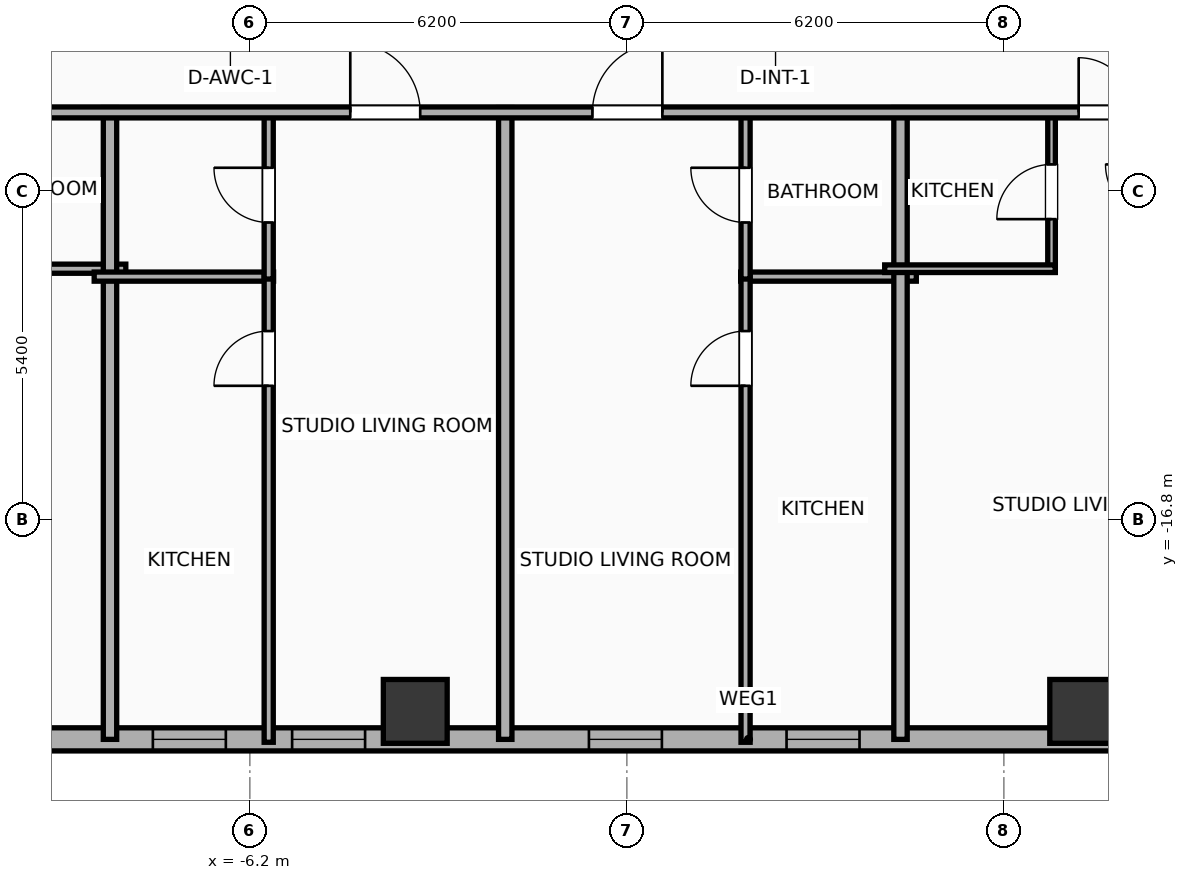
"""IFC4 building model, lengths in metres.
Left out: names, types, materials, properties, quantities, classifications, styles, units other than length and angle.
Written with IfcOpenShell. Run it as: python <this file> out.ifc"""

import sys

from ifc_helpers import new_model, si_unit, direction, frame, frame_2d, origin, origin_2d, place, context, subcontext, project, spatial, rectangle, hollow_rectangle, extrude, element, fill, save


model = new_model("IFC4")
c1 = context("Model", 3, precision=1e-05, world=origin(), true_north=direction((0.0, 1.0)))
c2 = subcontext(c1, "Body", "Model", "MODEL_VIEW")
j1 = project(units=[si_unit("LENGTHUNIT", "METRE"), si_unit("PLANEANGLEUNIT", "RADIAN")], contexts=[c1])
p1 = place(None, origin())
s1 = spatial("IfcSite", under=j1, at=p1, CompositionType="ELEMENT")
p2 = place(p1, origin())
s2 = spatial("IfcBuilding", under=s1, at=p2, CompositionType="ELEMENT")
p3 = place(p2, frame((0.0, 0.0, 128.7)))
s3 = spatial("IfcBuildingStorey", under=s2, at=p3, CompositionType="ELEMENT", Elevation=128.7)
for number, where, z_axis, x_axis in (
    (1, (-3.48, -19.95, 0.0), (0.0, 0.0, 1.0), (1.0, 0.0, 0.0)),
    (2, (7.48, -19.95, 0.0), (0.0, 0.0, 1.0), (1.0, 0.0, 0.0)),
):
    element("IfcColumn", number, at=place(p3, frame(where, z_axis=z_axis, x_axis=x_axis)), inside=s3, PredefinedType="COLUMN", context=c2, shape_type="SweptSolid", body=[
        extrude(hollow_rectangle(XDim=1.05, YDim=1.05, WallThickness=0.036, at=origin_2d()), origin(), (0.0, 0.0, 1.0), 3.9),
    ])
p4 = place(p3, frame((29.381, -20.41, 0.0), z_axis=(0.0, 0.0, 1.0), x_axis=(-1.0, 0.0, 0.0)))
e3 = element("IfcWall", 3, at=p4, inside=s3, PredefinedType="ELEMENTEDWALL", context=c2, shape_type="SweptSolid", body=[
    extrude(rectangle(XDim=54.763, YDim=0.38, at=frame_2d((27.381, 0.0))), origin(), (0.0, 0.0, 1.0), 3.65),
])
p5 = place(p4, frame((45.067, 0.0, 0.75)))
e4 = element("IfcOpeningElement", 4, at=p5, cuts=e3, PredefinedType="OPENING", context=c2, shape_type="SweptSolid", body=[
    extrude(rectangle(XDim=2.4, YDim=2.1, at=frame_2d((1.2, 1.05))), frame((0.0, 0.2, 0.0), z_axis=(0.0, -1.0, 0.0), x_axis=(1.0, 0.0, 0.0)), (0.0, 0.0, 1.0), 0.4),
])
p6 = place(p4, frame((51.777, 0.0, 0.75)))
e5 = element("IfcOpeningElement", 5, at=p6, cuts=e3, PredefinedType="OPENING", context=c2, shape_type="SweptSolid", body=[
    extrude(rectangle(XDim=1.2, YDim=2.05, at=frame_2d((0.6, 1.025))), frame((0.0, 0.2, 0.0), z_axis=(0.0, -1.0, 0.0), x_axis=(1.0, 0.0, 0.0)), (0.0, 0.0, 1.0), 0.4),
])
p7 = place(p4, frame((48.976, 0.0, 0.75)))
e6 = element("IfcOpeningElement", 6, at=p7, cuts=e3, PredefinedType="OPENING", context=c2, shape_type="SweptSolid", body=[
    extrude(rectangle(XDim=1.2, YDim=2.05, at=frame_2d((0.6, 1.025))), frame((0.0, 0.2, 0.0), z_axis=(0.0, -1.0, 0.0), x_axis=(1.0, 0.0, 0.0)), (0.0, 0.0, 1.0), 0.4),
])
p8 = place(p4, frame((40.531, 0.0, 0.75)))
e7 = element("IfcOpeningElement", 7, at=p8, cuts=e3, PredefinedType="OPENING", context=c2, shape_type="SweptSolid", body=[
    extrude(rectangle(XDim=1.2, YDim=2.05, at=frame_2d((0.6, 1.025))), frame((0.0, 0.2, 0.0), z_axis=(0.0, -1.0, 0.0), x_axis=(1.0, 0.0, 0.0)), (0.0, 0.0, 1.0), 0.4),
])
p9 = place(p4, frame((33.686, 0.0, 0.75)))
e8 = element("IfcOpeningElement", 8, at=p9, cuts=e3, PredefinedType="OPENING", context=c2, shape_type="SweptSolid", body=[
    extrude(rectangle(XDim=1.2, YDim=2.05, at=frame_2d((0.6, 1.025))), frame((0.0, 0.2, 0.0), z_axis=(0.0, -1.0, 0.0), x_axis=(1.0, 0.0, 0.0)), (0.0, 0.0, 1.0), 0.4),
])
p10 = place(p4, frame((35.976, 0.0, 0.75)))
e9 = element("IfcOpeningElement", 9, at=p10, cuts=e3, PredefinedType="OPENING", context=c2, shape_type="SweptSolid", body=[
    extrude(rectangle(XDim=1.2, YDim=2.05, at=frame_2d((0.6, 1.025))), frame((0.0, 0.2, 0.0), z_axis=(0.0, -1.0, 0.0), x_axis=(1.0, 0.0, 0.0)), (0.0, 0.0, 1.0), 0.4),
])
p11 = place(p4, frame((28.805, 0.0, 0.75)))
e10 = element("IfcOpeningElement", 10, at=p11, cuts=e3, PredefinedType="OPENING", context=c2, shape_type="SweptSolid", body=[
    extrude(rectangle(XDim=1.2, YDim=2.05, at=frame_2d((0.6, 1.025))), frame((0.0, 0.2, 0.0), z_axis=(0.0, -1.0, 0.0), x_axis=(1.0, 0.0, 0.0)), (0.0, 0.0, 1.0), 0.4),
])
p12 = place(p4, frame((25.555, 0.0, 0.75)))
e11 = element("IfcOpeningElement", 11, at=p12, cuts=e3, PredefinedType="OPENING", context=c2, shape_type="SweptSolid", body=[
    extrude(rectangle(XDim=1.2, YDim=2.05, at=frame_2d((0.6, 1.025))), frame((0.0, 0.2, 0.0), z_axis=(0.0, -1.0, 0.0), x_axis=(1.0, 0.0, 0.0)), (0.0, 0.0, 1.0), 0.4),
])
p13 = place(p4, frame((19.951, 0.0, 0.75)))
e12 = element("IfcOpeningElement", 12, at=p13, cuts=e3, PredefinedType="OPENING", context=c2, shape_type="SweptSolid", body=[
    extrude(rectangle(XDim=1.2, YDim=2.05, at=frame_2d((0.6, 1.025))), frame((0.0, 0.2, 0.0), z_axis=(0.0, -1.0, 0.0), x_axis=(1.0, 0.0, 0.0)), (0.0, 0.0, 1.0), 0.4),
])
p14 = place(p4, frame((15.836, 0.0, 0.75)))
e13 = element("IfcOpeningElement", 13, at=p14, cuts=e3, PredefinedType="OPENING", context=c2, shape_type="SweptSolid", body=[
    extrude(rectangle(XDim=1.2, YDim=2.05, at=frame_2d((0.6, 1.025))), frame((0.0, 0.2, 0.0), z_axis=(0.0, -1.0, 0.0), x_axis=(1.0, 0.0, 0.0)), (0.0, 0.0, 1.0), 0.4),
])
p15 = place(p4, frame((12.586, 0.0, 0.75)))
e14 = element("IfcOpeningElement", 14, at=p15, cuts=e3, PredefinedType="OPENING", context=c2, shape_type="SweptSolid", body=[
    extrude(rectangle(XDim=1.2, YDim=2.05, at=frame_2d((0.6, 1.025))), frame((0.0, 0.2, 0.0), z_axis=(0.0, -1.0, 0.0), x_axis=(1.0, 0.0, 0.0)), (0.0, 0.0, 1.0), 0.4),
])
p16 = place(p4, frame((9.011, 0.0, 0.75)))
e15 = element("IfcOpeningElement", 15, at=p16, cuts=e3, PredefinedType="OPENING", context=c2, shape_type="SweptSolid", body=[
    extrude(rectangle(XDim=1.2, YDim=2.05, at=frame_2d((0.6, 1.025))), frame((0.0, 0.2, 0.0), z_axis=(0.0, -1.0, 0.0), x_axis=(1.0, 0.0, 0.0)), (0.0, 0.0, 1.0), 0.4),
])
p17 = place(p4, frame((6.001, 0.0, 0.75)))
e16 = element("IfcOpeningElement", 16, at=p17, cuts=e3, PredefinedType="OPENING", context=c2, shape_type="SweptSolid", body=[
    extrude(rectangle(XDim=1.2, YDim=2.05, at=frame_2d((0.6, 1.025))), frame((0.0, 0.2, 0.0), z_axis=(0.0, -1.0, 0.0), x_axis=(1.0, 0.0, 0.0)), (0.0, 0.0, 1.0), 0.4),
])
p18 = place(p4, frame((2.536, 0.0, 0.75)))
e17 = element("IfcOpeningElement", 17, at=p18, cuts=e3, PredefinedType="OPENING", context=c2, shape_type="SweptSolid", body=[
    extrude(rectangle(XDim=1.2, YDim=2.05, at=frame_2d((0.6, 1.025))), frame((0.0, 0.2, 0.0), z_axis=(0.0, -1.0, 0.0), x_axis=(1.0, 0.0, 0.0)), (0.0, 0.0, 1.0), 0.4),
])
p19 = place(p3, frame((-10.789, -12.67, 0.0), z_axis=(0.0, 0.0, 1.0), x_axis=(1.0, 0.0, 0.0)))
e18 = element("IfcWall", 18, at=p19, inside=s3, PredefinedType="PLUMBINGWALL", context=c2, shape_type="SweptSolid", body=[
    extrude(rectangle(XDim=2.549, YDim=0.15, at=frame_2d((1.274, 0.0))), origin(), (0.0, 0.0, 1.0), 3.65),
])
p20 = place(p3, frame((-8.5, -20.41, 0.0), z_axis=(0.0, 0.0, 1.0), x_axis=(0.0, 1.0, 0.0)))
e19 = element("IfcWall", 19, at=p20, inside=s3, PredefinedType="PARTITIONING", context=c2, shape_type="SweptSolid", body=[
    extrude(rectangle(XDim=10.39, YDim=0.22, at=frame_2d((5.195, 0.0))), origin(), (0.0, 0.0, 1.0), 3.65),
])
p21 = place(p3, frame((-8.76, -12.8, 0.0), z_axis=(0.0, 0.0, 1.0), x_axis=(1.0, 0.0, 0.0)))
e20 = element("IfcWall", 20, at=p21, inside=s3, PredefinedType="PLUMBINGWALL", context=c2, shape_type="SweptSolid", body=[
    extrude(rectangle(XDim=2.95, YDim=0.15, at=frame_2d((1.475, 0.0))), origin(), (0.0, 0.0, 1.0), 3.65),
])
p22 = place(p3, frame((-5.89, -20.458, 0.0), z_axis=(0.0, 0.0, 1.0), x_axis=(0.0, 1.0, 0.0)))
e21 = element("IfcWall", 21, at=p22, inside=s3, PredefinedType="PLUMBINGWALL", context=c2, shape_type="SweptSolid", body=[
    extrude(rectangle(XDim=7.698, YDim=0.15, at=frame_2d((3.849, 0.0))), origin(), (0.0, 0.0, 1.0), 3.65),
])
p23 = place(p22, frame((5.862, 0.0, 0.0)))
e22 = element("IfcOpeningElement", 22, at=p23, cuts=e21, PredefinedType="OPENING", context=c2, shape_type="SweptSolid", body=[
    extrude(rectangle(XDim=0.9, YDim=2.05, at=frame_2d((0.45, 1.025))), frame((0.0, 0.085, 0.0), z_axis=(0.0, -1.0, 0.0), x_axis=(1.0, 0.0, 0.0)), (0.0, 0.0, 1.0), 0.17),
])
p24 = place(p3, frame((-5.89, -12.84, 0.0), z_axis=(0.0, 0.0, 1.0), x_axis=(0.0, 1.0, 0.0)))
e23 = element("IfcWall", 23, at=p24, inside=s3, PredefinedType="PLUMBINGWALL", context=c2, shape_type="SweptSolid", body=[
    extrude(rectangle(XDim=2.76, YDim=0.15, at=frame_2d((1.38, 0.0))), origin(), (0.0, 0.0, 1.0), 3.65),
])
p25 = place(p24, frame((0.93, 0.0, 0.0)))
e24 = element("IfcOpeningElement", 24, at=p25, cuts=e23, PredefinedType="OPENING", context=c2, shape_type="SweptSolid", body=[
    extrude(rectangle(XDim=0.9, YDim=2.05, at=frame_2d((0.45, 1.025))), frame((0.0, 0.085, 0.0), z_axis=(0.0, -1.0, 0.0), x_axis=(1.0, 0.0, 0.0)), (0.0, 0.0, 1.0), 0.17),
])
p26 = place(p3, frame((-2.0, -20.41, 0.0), z_axis=(0.0, 0.0, 1.0), x_axis=(0.0, 1.0, 0.0)))
e25 = element("IfcWall", 25, at=p26, inside=s3, PredefinedType="PARTITIONING", context=c2, shape_type="SweptSolid", body=[
    extrude(rectangle(XDim=10.39, YDim=0.22, at=frame_2d((5.195, 0.0))), origin(), (0.0, 0.0, 1.0), 3.65),
])
p27 = place(p3, frame((1.872, -12.8, 0.0), z_axis=(0.0, 0.0, 1.0), x_axis=(1.0, 0.0, 0.0)))
e26 = element("IfcWall", 26, at=p27, inside=s3, PredefinedType="PLUMBINGWALL", context=c2, shape_type="SweptSolid", body=[
    extrude(rectangle(XDim=2.888, YDim=0.15, at=frame_2d((1.444, 0.0))), origin(), (0.0, 0.0, 1.0), 3.65),
])
p28 = place(p3, frame((1.952, -20.458, 0.0), z_axis=(0.0, 0.0, 1.0), x_axis=(0.0, 1.0, 0.0)))
e27 = element("IfcWall", 27, at=p28, inside=s3, PredefinedType="PLUMBINGWALL", context=c2, shape_type="SweptSolid", body=[
    extrude(rectangle(XDim=7.698, YDim=0.15, at=frame_2d((3.849, 0.0))), origin(), (0.0, 0.0, 1.0), 3.65),
])
p29 = place(p28, frame((5.862, 0.0, 0.0)))
e28 = element("IfcOpeningElement", 28, at=p29, cuts=e27, PredefinedType="OPENING", context=c2, shape_type="SweptSolid", body=[
    extrude(rectangle(XDim=0.9, YDim=2.05, at=frame_2d((0.45, 1.025))), frame((0.0, 0.085, 0.0), z_axis=(0.0, -1.0, 0.0), x_axis=(1.0, 0.0, 0.0)), (0.0, 0.0, 1.0), 0.17),
])
p30 = place(p3, frame((1.952, -12.84, 0.0), z_axis=(0.0, 0.0, 1.0), x_axis=(0.0, 1.0, 0.0)))
e29 = element("IfcWall", 29, at=p30, inside=s3, PredefinedType="PLUMBINGWALL", context=c2, shape_type="SweptSolid", body=[
    extrude(rectangle(XDim=2.76, YDim=0.15, at=frame_2d((1.38, 0.0))), origin(), (0.0, 0.0, 1.0), 3.65),
])
p31 = place(p30, frame((0.93, 0.0, 0.0)))
e30 = element("IfcOpeningElement", 30, at=p31, cuts=e29, PredefinedType="OPENING", context=c2, shape_type="SweptSolid", body=[
    extrude(rectangle(XDim=0.9, YDim=2.05, at=frame_2d((0.45, 1.025))), frame((0.0, 0.085, 0.0), z_axis=(0.0, -1.0, 0.0), x_axis=(1.0, 0.0, 0.0)), (0.0, 0.0, 1.0), 0.17),
])
p32 = place(p3, frame((4.5, -20.41, 0.0), z_axis=(0.0, 0.0, 1.0), x_axis=(0.0, 1.0, 0.0)))
e31 = element("IfcWall", 31, at=p32, inside=s3, PredefinedType="PARTITIONING", context=c2, shape_type="SweptSolid", body=[
    extrude(rectangle(XDim=10.39, YDim=0.22, at=frame_2d((5.195, 0.0))), origin(), (0.0, 0.0, 1.0), 3.65),
])
p33 = place(p3, frame((6.984, -12.73, 0.0), z_axis=(0.0, 0.0, 1.0), x_axis=(0.0, 1.0, 0.0)))
e32 = element("IfcWall", 32, at=p33, inside=s3, PredefinedType="PARTITIONING", context=c2, shape_type="SweptSolid", body=[
    extrude(rectangle(XDim=2.65, YDim=0.125, at=frame_2d((1.325, 0.0))), origin(), (0.0, 0.0, 1.0), 3.65),
])
p34 = place(p33, frame((0.875, 0.0, 0.0)))
e33 = element("IfcOpeningElement", 33, at=p34, cuts=e32, PredefinedType="OPENING", context=c2, shape_type="SweptSolid", body=[
    extrude(rectangle(XDim=0.9, YDim=2.05, at=frame_2d((0.45, 1.025))), frame((0.0, 0.073, 0.0), z_axis=(0.0, -1.0, 0.0), x_axis=(1.0, 0.0, 0.0)), (0.0, 0.0, 1.0), 0.145),
])
p35 = place(p3, frame((4.24, -12.67, 0.0), z_axis=(0.0, 0.0, 1.0), x_axis=(1.0, 0.0, 0.0)))
e34 = element("IfcWall", 34, at=p35, inside=s3, PredefinedType="PARTITIONING", context=c2, shape_type="SweptSolid", body=[
    extrude(rectangle(XDim=2.804, YDim=0.125, at=frame_2d((1.402, 0.0))), origin(), (0.0, 0.0, 1.0), 3.65),
])
p36 = place(p3, frame((-29.21, -10.1, 0.0), z_axis=(0.0, 0.0, 1.0), x_axis=(1.0, 0.0, 0.0)))
e35 = element("IfcWall", 35, at=p36, inside=s3, PredefinedType="PARTITIONING", context=c2, shape_type="SweptSolid", body=[
    extrude(rectangle(XDim=62.42, YDim=0.18, at=frame_2d((31.21, 0.0))), origin(), (0.0, 0.0, 1.0), 3.65),
])
p37 = place(p36, frame((3.414, 0.0, 0.0)))
e36 = element("IfcOpeningElement", 36, at=p37, cuts=e35, PredefinedType="OPENING", context=c2, shape_type="SweptSolid", body=[
    extrude(rectangle(XDim=1.15, YDim=2.05, at=frame_2d((0.575, 1.025))), frame((0.0, 0.1, 0.0), z_axis=(0.0, -1.0, 0.0), x_axis=(1.0, 0.0, 0.0)), (0.0, 0.0, 1.0), 0.2),
])
p38 = place(p36, frame((11.659, 0.0, 0.0)))
e37 = element("IfcOpeningElement", 37, at=p38, cuts=e35, PredefinedType="OPENING", context=c2, shape_type="SweptSolid", body=[
    extrude(rectangle(XDim=1.15, YDim=2.05, at=frame_2d((0.575, 1.025))), frame((0.0, 0.1, 0.0), z_axis=(0.0, -1.0, 0.0), x_axis=(1.0, 0.0, 0.0)), (0.0, 0.0, 1.0), 0.2),
])
p39 = place(p36, frame((17.14, 0.0, 0.0)))
e38 = element("IfcOpeningElement", 38, at=p39, cuts=e35, PredefinedType="OPENING", context=c2, shape_type="SweptSolid", body=[
    extrude(rectangle(XDim=0.9, YDim=2.05, at=frame_2d((0.45, 1.025))), frame((0.0, 0.1, 0.0), z_axis=(0.0, -1.0, 0.0), x_axis=(1.0, 0.0, 0.0)), (0.0, 0.0, 1.0), 0.2),
])
p40 = place(p36, frame((24.661, 0.0, 0.0)))
e39 = element("IfcOpeningElement", 39, at=p40, cuts=e35, PredefinedType="OPENING", context=c2, shape_type="SweptSolid", body=[
    extrude(rectangle(XDim=1.15, YDim=2.05, at=frame_2d((0.575, 1.025))), frame((0.0, 0.1, 0.0), z_axis=(0.0, -1.0, 0.0), x_axis=(1.0, 0.0, 0.0)), (0.0, 0.0, 1.0), 0.2),
])
p41 = place(p36, frame((28.644, 0.0, 0.0)))
e40 = element("IfcOpeningElement", 40, at=p41, cuts=e35, PredefinedType="OPENING", context=c2, shape_type="SweptSolid", body=[
    extrude(rectangle(XDim=1.15, YDim=2.05, at=frame_2d((0.575, 1.025))), frame((0.0, 0.1, 0.0), z_axis=(0.0, -1.0, 0.0), x_axis=(1.0, 0.0, 0.0)), (0.0, 0.0, 1.0), 0.2),
])
p42 = place(p36, frame((36.64, 0.0, 0.0)))
e41 = element("IfcOpeningElement", 41, at=p42, cuts=e35, PredefinedType="OPENING", context=c2, shape_type="SweptSolid", body=[
    extrude(rectangle(XDim=0.9, YDim=2.05, at=frame_2d((0.45, 1.025))), frame((0.0, 0.1, 0.0), z_axis=(0.0, -1.0, 0.0), x_axis=(1.0, 0.0, 0.0)), (0.0, 0.0, 1.0), 0.2),
])
p43 = place(p36, frame((41.608, 0.0, 0.0)))
e42 = element("IfcOpeningElement", 42, at=p43, cuts=e35, PredefinedType="OPENING", context=c2, shape_type="SweptSolid", body=[
    extrude(rectangle(XDim=1.15, YDim=2.05, at=frame_2d((0.575, 1.025))), frame((0.0, 0.1, 0.0), z_axis=(0.0, -1.0, 0.0), x_axis=(1.0, 0.0, 0.0)), (0.0, 0.0, 1.0), 0.2),
])
p44 = place(p36, frame((48.194, 0.0, 0.0)))
e43 = element("IfcOpeningElement", 43, at=p44, cuts=e35, PredefinedType="OPENING", context=c2, shape_type="SweptSolid", body=[
    extrude(rectangle(XDim=1.15, YDim=2.05, at=frame_2d((0.575, 1.025))), frame((0.0, 0.1, 0.0), z_axis=(0.0, -1.0, 0.0), x_axis=(1.0, 0.0, 0.0)), (0.0, 0.0, 1.0), 0.2),
])
p45 = place(p36, frame((57.525, 0.0, 0.0)))
e44 = element("IfcOpeningElement", 44, at=p45, cuts=e35, PredefinedType="OPENING", context=c2, shape_type="SweptSolid", body=[
    extrude(rectangle(XDim=1.15, YDim=2.05, at=frame_2d((0.575, 1.025))), frame((0.0, 0.1, 0.0), z_axis=(0.0, -1.0, 0.0), x_axis=(1.0, 0.0, 0.0)), (0.0, 0.0, 1.0), 0.2),
])
p46 = place(p9, origin())
e45 = element("IfcWindow", 45, at=p46, inside=s3, PartitioningType="SINGLE_PANEL", PredefinedType="WINDOW", context=c2, shape_type="SweptSolid", body=[
    extrude(rectangle(XDim=1.2, YDim=2.05, at=frame_2d((0.6, 1.025))), frame((0.0, 0.03, 0.0), z_axis=(0.0, -1.0, 0.0), x_axis=(1.0, 0.0, 0.0)), (0.0, 0.0, 1.0), 0.06),
])
fill(e8, e45)
p47 = place(p10, origin())
e46 = element("IfcWindow", 46, at=p47, inside=s3, PartitioningType="SINGLE_PANEL", PredefinedType="WINDOW", context=c2, shape_type="SweptSolid", body=[
    extrude(rectangle(XDim=1.2, YDim=2.05, at=frame_2d((0.6, 1.025))), frame((0.0, 0.03, 0.0), z_axis=(0.0, -1.0, 0.0), x_axis=(1.0, 0.0, 0.0)), (0.0, 0.0, 1.0), 0.06),
])
fill(e9, e46)
p48 = place(p11, origin())
e47 = element("IfcWindow", 47, at=p48, inside=s3, PartitioningType="SINGLE_PANEL", PredefinedType="WINDOW", context=c2, shape_type="SweptSolid", body=[
    extrude(rectangle(XDim=1.2, YDim=2.05, at=frame_2d((0.6, 1.025))), frame((0.0, 0.03, 0.0), z_axis=(0.0, -1.0, 0.0), x_axis=(1.0, 0.0, 0.0)), (0.0, 0.0, 1.0), 0.06),
])
fill(e10, e47)
p49 = place(p12, origin())
e48 = element("IfcWindow", 48, at=p49, inside=s3, PartitioningType="SINGLE_PANEL", PredefinedType="WINDOW", context=c2, shape_type="SweptSolid", body=[
    extrude(rectangle(XDim=1.2, YDim=2.05, at=frame_2d((0.6, 1.025))), frame((0.0, 0.03, 0.0), z_axis=(0.0, -1.0, 0.0), x_axis=(1.0, 0.0, 0.0)), (0.0, 0.0, 1.0), 0.06),
])
fill(e11, e48)
p50 = place(p23, origin())
e49 = element("IfcDoor", 49, at=p50, inside=s3, OperationType="SINGLE_SWING_LEFT", PredefinedType="DOOR", context=c2, shape_type="SweptSolid", body=[
    extrude(rectangle(XDim=0.9, YDim=2.05, at=frame_2d((0.45, 1.025))), frame((0.0, 0.025, 0.0), z_axis=(0.0, -1.0, 0.0), x_axis=(1.0, 0.0, 0.0)), (0.0, 0.0, 1.0), 0.05),
])
fill(e22, e49)
p51 = place(p25, origin())
e50 = element("IfcDoor", 50, at=p51, inside=s3, OperationType="SINGLE_SWING_RIGHT", PredefinedType="DOOR", context=c2, shape_type="SweptSolid", body=[
    extrude(rectangle(XDim=0.9, YDim=2.05, at=frame_2d((0.45, 1.025))), frame((0.0, 0.025, 0.0), z_axis=(0.0, -1.0, 0.0), x_axis=(1.0, 0.0, 0.0)), (0.0, 0.0, 1.0), 0.05),
])
fill(e24, e50)
p52 = place(p29, origin())
e51 = element("IfcDoor", 51, at=p52, inside=s3, OperationType="SINGLE_SWING_LEFT", PredefinedType="DOOR", context=c2, shape_type="SweptSolid", body=[
    extrude(rectangle(XDim=0.9, YDim=2.05, at=frame_2d((0.45, 1.025))), frame((0.0, 0.025, 0.0), z_axis=(0.0, -1.0, 0.0), x_axis=(1.0, 0.0, 0.0)), (0.0, 0.0, 1.0), 0.05),
])
fill(e28, e51)
p53 = place(p31, origin())
e52 = element("IfcDoor", 52, at=p53, inside=s3, OperationType="SINGLE_SWING_RIGHT", PredefinedType="DOOR", context=c2, shape_type="SweptSolid", body=[
    extrude(rectangle(XDim=0.9, YDim=2.05, at=frame_2d((0.45, 1.025))), frame((0.0, 0.025, 0.0), z_axis=(0.0, -1.0, 0.0), x_axis=(1.0, 0.0, 0.0)), (0.0, 0.0, 1.0), 0.05),
])
fill(e30, e52)
p54 = place(p34, origin())
e53 = element("IfcDoor", 53, at=p54, inside=s3, OperationType="SINGLE_SWING_LEFT", PredefinedType="DOOR", context=c2, shape_type="SweptSolid", body=[
    extrude(rectangle(XDim=0.9, YDim=2.05, at=frame_2d((0.45, 1.025))), frame((0.0, 0.025, 0.0), z_axis=(0.0, -1.0, 0.0), x_axis=(1.0, 0.0, 0.0)), (0.0, 0.0, 1.0), 0.05),
])
fill(e33, e53)
p55 = place(p40, origin())
e54 = element("IfcDoor", 54, at=p55, inside=s3, OperationType="SINGLE_SWING_LEFT", PredefinedType="DOOR", context=c2, shape_type="SweptSolid", body=[
    extrude(rectangle(XDim=1.15, YDim=2.05, at=frame_2d((0.575, 1.025))), frame((0.0, 0.025, 0.0), z_axis=(0.0, -1.0, 0.0), x_axis=(1.0, 0.0, 0.0)), (0.0, 0.0, 1.0), 0.05),
])
fill(e39, e54)
p56 = place(p41, origin())
e55 = element("IfcDoor", 55, at=p56, inside=s3, OperationType="SINGLE_SWING_RIGHT", PredefinedType="DOOR", context=c2, shape_type="SweptSolid", body=[
    extrude(rectangle(XDim=1.15, YDim=2.05, at=frame_2d((0.575, 1.025))), frame((0.0, 0.025, 0.0), z_axis=(0.0, -1.0, 0.0), x_axis=(1.0, 0.0, 0.0)), (0.0, 0.0, 1.0), 0.05),
])
fill(e40, e55)
p57 = place(p42, origin())
e56 = element("IfcDoor", 56, at=p57, inside=s3, OperationType="SINGLE_SWING_LEFT", PredefinedType="DOOR", context=c2, shape_type="SweptSolid", body=[
    extrude(rectangle(XDim=0.9, YDim=2.05, at=frame_2d((0.45, 1.025))), frame((0.0, 0.025, 0.0), z_axis=(0.0, -1.0, 0.0), x_axis=(1.0, 0.0, 0.0)), (0.0, 0.0, 1.0), 0.05),
])
fill(e41, e56)
save(model, sys.argv[1])
